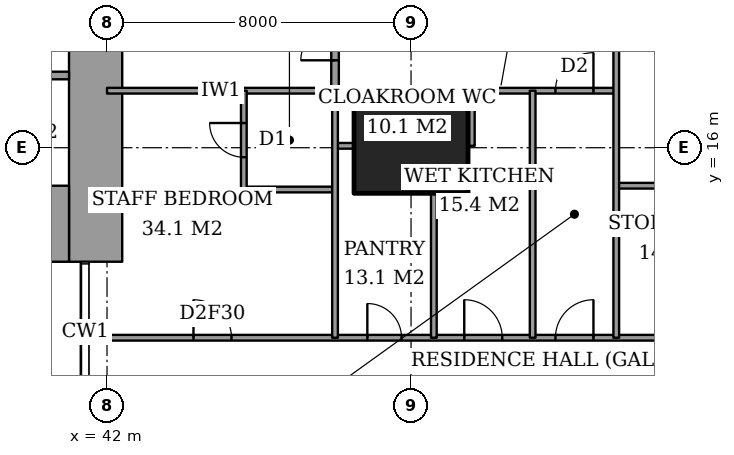
"""IFC4 building model, lengths in metres.
Left out: names, types, materials, properties, quantities, classifications, styles, units other than length and angle.
Written with IfcOpenShell. Run it as: python <this file> out.ifc"""

import sys

from ifc_helpers import new_model, si_unit, direction, frame, frame_2d, origin, origin_2d, place, context, subcontext, project, spatial, rectangle, extrude, element, fill, save


model = new_model("IFC4")
c1 = context("Model", 3, precision=1e-05, world=origin(), true_north=direction((0.0, 1.0)))
c2 = subcontext(c1, "Body", "Model", "MODEL_VIEW")
j1 = project(units=[si_unit("LENGTHUNIT", "METRE"), si_unit("PLANEANGLEUNIT", "RADIAN")], contexts=[c1])
p1 = place(None, origin())
s1 = spatial("IfcSite", under=j1, at=p1, CompositionType="ELEMENT")
p2 = place(p1, origin())
s2 = spatial("IfcBuilding", under=s1, at=p2, CompositionType="ELEMENT")
p3 = place(p2, frame((0.0, 0.0, 211.0)))
s3 = spatial("IfcBuildingStorey", under=s2, at=p3, CompositionType="ELEMENT", Elevation=211.0)
p4 = place(p3, frame((50.0, 16.0, 0.0), z_axis=(0.0, 0.0, 1.0), x_axis=(1.0, 0.0, 0.0)))
e1 = element("IfcColumn", 1, at=p4, inside=s3, PredefinedType="COLUMN", context=c2, shape_type="SweptSolid", body=[
    extrude(rectangle(XDim=3.0, YDim=2.4, at=origin_2d()), origin(), (0.0, 0.0, 1.0), 3.6),
])
p5 = place(p3, frame((37.85, 14.0, 0.0), z_axis=(0.0, 0.0, 1.0), x_axis=(1.0, 0.0, 0.0)))
e2 = element("IfcWall", 2, at=p5, inside=s3, PredefinedType="SHEAR", context=c2, shape_type="SweptSolid", body=[
    extrude(rectangle(XDim=3.15, YDim=2.0, at=frame_2d((1.575, 0.0))), origin(), (0.0, 0.0, 1.0), 3.6),
])
p6 = place(p3, frame((41.7, 13.0, 0.0), z_axis=(0.0, 0.0, 1.0), x_axis=(0.0, 1.0, 0.0)))
e3 = element("IfcWall", 3, at=p6, inside=s3, PredefinedType="SHEAR", context=c2, shape_type="SweptSolid", body=[
    extrude(rectangle(XDim=11.85, YDim=1.4, at=frame_2d((5.925, 0.0))), origin(), (0.0, 0.0, 1.0), 3.6),
])
p7 = place(p6, frame((7.5, 0.0, 0.0)))
e4 = element("IfcOpeningElement", 4, at=p7, cuts=e3, PredefinedType="OPENING", context=c2, shape_type="SweptSolid", body=[
    extrude(rectangle(XDim=1.8, YDim=2.4, at=frame_2d((0.9, 1.2))), frame((0.0, 0.71, 0.0), z_axis=(0.0, -1.0, 0.0), x_axis=(1.0, 0.0, 0.0)), (0.0, 0.0, 1.0), 1.42),
])
p8 = place(p3, frame((41.439, 11.0, 0.0), z_axis=(0.0, 0.0, 1.0), x_axis=(1.0, 0.0, 0.0)))
e5 = element("IfcWall", 5, at=p8, inside=s3, PredefinedType="PARTITIONING", context=c2, shape_type="SweptSolid", body=[
    extrude(rectangle(XDim=25.011, YDim=0.15, at=frame_2d((12.505, 0.0))), origin(), (0.0, 0.0, 1.0), 3.35),
])
p9 = place(p8, frame((12.361, 0.0, 0.0)))
e6 = element("IfcOpeningElement", 6, at=p9, cuts=e5, PredefinedType="OPENING", context=c2, shape_type="SweptSolid", body=[
    extrude(rectangle(XDim=1.0, YDim=2.1, at=frame_2d((0.5, 1.05))), frame((0.0, 0.085, 0.0), z_axis=(0.0, -1.0, 0.0), x_axis=(1.0, 0.0, 0.0)), (0.0, 0.0, 1.0), 0.17),
])
p10 = place(p8, frame((20.924, 0.0, 0.0)))
e7 = element("IfcOpeningElement", 7, at=p10, cuts=e5, PredefinedType="OPENING", context=c2, shape_type="SweptSolid", body=[
    extrude(rectangle(XDim=1.0, YDim=2.1, at=frame_2d((0.5, 1.05))), frame((0.0, 0.085, 0.0), z_axis=(0.0, -1.0, 0.0), x_axis=(1.0, 0.0, 0.0)), (0.0, 0.0, 1.0), 0.17),
])
p11 = place(p8, frame((15.448, 0.0, 0.0)))
e8 = element("IfcOpeningElement", 8, at=p11, cuts=e5, PredefinedType="OPENING", context=c2, shape_type="SweptSolid", body=[
    extrude(rectangle(XDim=0.9, YDim=2.1, at=frame_2d((0.45, 1.05))), frame((0.0, 0.085, 0.0), z_axis=(0.0, -1.0, 0.0), x_axis=(1.0, 0.0, 0.0)), (0.0, 0.0, 1.0), 0.17),
])
p12 = place(p8, frame((9.961, 0.0, 0.0)))
e9 = element("IfcOpeningElement", 9, at=p12, cuts=e5, PredefinedType="OPENING", context=c2, shape_type="SweptSolid", body=[
    extrude(rectangle(XDim=1.0, YDim=2.1, at=frame_2d((0.5, 1.05))), frame((0.0, 0.085, 0.0), z_axis=(0.0, -1.0, 0.0), x_axis=(1.0, 0.0, 0.0)), (0.0, 0.0, 1.0), 0.17),
])
p13 = place(p8, frame((7.411, 0.0, 0.0)))
e10 = element("IfcOpeningElement", 10, at=p13, cuts=e5, PredefinedType="OPENING", context=c2, shape_type="SweptSolid", body=[
    extrude(rectangle(XDim=0.9, YDim=2.1, at=frame_2d((0.45, 1.05))), frame((0.0, 0.085, 0.0), z_axis=(0.0, -1.0, 0.0), x_axis=(1.0, 0.0, 0.0)), (0.0, 0.0, 1.0), 0.17),
])
p14 = place(p8, frame((2.836, 0.0, 0.0)))
e11 = element("IfcOpeningElement", 11, at=p14, cuts=e5, PredefinedType="OPENING", context=c2, shape_type="SweptSolid", body=[
    extrude(rectangle(XDim=1.0, YDim=2.1, at=frame_2d((0.5, 1.05))), frame((0.0, 0.085, 0.0), z_axis=(0.0, -1.0, 0.0), x_axis=(1.0, 0.0, 0.0)), (0.0, 0.0, 1.0), 0.17),
])
p15 = place(p3, frame((45.6, 14.9, 0.0), z_axis=(0.0, 0.0, 1.0), x_axis=(1.0, 0.0, 0.0)))
e12 = element("IfcWall", 12, at=p15, inside=s3, PredefinedType="PARTITIONING", context=c2, shape_type="SweptSolid", body=[
    extrude(rectangle(XDim=2.4, YDim=0.15, at=frame_2d((1.2, 0.0))), origin(), (0.0, 0.0, 1.0), 3.35),
])
p16 = place(p3, frame((55.4, 15.0, 0.0), z_axis=(0.0, 0.0, 1.0), x_axis=(1.0, 0.0, 0.0)))
e13 = element("IfcWall", 13, at=p16, inside=s3, PredefinedType="PARTITIONING", context=c2, shape_type="SweptSolid", body=[
    extrude(rectangle(XDim=1.1, YDim=0.15, at=frame_2d((0.55, 0.0))), origin(), (0.0, 0.0, 1.0), 3.35),
])
p17 = place(p3, frame((48.0, 16.05, 0.0), z_axis=(0.0, 0.0, 1.0), x_axis=(1.0, 0.0, 0.0)))
e14 = element("IfcWall", 14, at=p17, inside=s3, PredefinedType="PARTITIONING", context=c2, shape_type="SweptSolid", body=[
    extrude(rectangle(XDim=0.5, YDim=0.15, at=frame_2d((0.25, 0.0))), origin(), (0.0, 0.0, 1.0), 2.634),
])
p18 = place(p3, frame((42.0, 17.5, 0.0), z_axis=(0.0, 0.0, 1.0), x_axis=(1.0, 0.0, 0.0)))
e15 = element("IfcWall", 15, at=p18, inside=s3, PredefinedType="PARTITIONING", context=c2, shape_type="SweptSolid", body=[
    extrude(rectangle(XDim=6.0, YDim=0.15, at=frame_2d((3.0, 0.0))), origin(), (0.0, 0.0, 1.0), 3.35),
])
p19 = place(p3, frame((51.6, 17.5, 0.0), z_axis=(0.0, 0.0, 1.0), x_axis=(1.0, 0.0, 0.0)))
e16 = element("IfcWall", 16, at=p19, inside=s3, PredefinedType="PARTITIONING", context=c2, shape_type="SweptSolid", body=[
    extrude(rectangle(XDim=3.8, YDim=0.15, at=frame_2d((1.9, 0.0))), origin(), (0.0, 0.0, 1.0), 3.35),
])
p20 = place(p19, frame((2.2, 0.0, 0.0)))
e17 = element("IfcOpeningElement", 17, at=p20, cuts=e16, PredefinedType="OPENING", context=c2, shape_type="SweptSolid", body=[
    extrude(rectangle(XDim=1.0, YDim=2.1, at=frame_2d((0.5, 1.05))), frame((0.0, 0.085, 0.0), z_axis=(0.0, -1.0, 0.0), x_axis=(1.0, 0.0, 0.0)), (0.0, 0.0, 1.0), 0.17),
])
p21 = place(p3, frame((45.6, 14.9, 0.0), z_axis=(0.0, 0.0, 1.0), x_axis=(0.0, 1.0, 0.0)))
e18 = element("IfcWall", 18, at=p21, inside=s3, PredefinedType="PARTITIONING", context=c2, shape_type="SweptSolid", body=[
    extrude(rectangle(XDim=2.6, YDim=0.15, at=frame_2d((1.3, 0.0))), origin(), (0.0, 0.0, 1.0), 3.35),
])
p22 = place(p21, frame((0.85, 0.0, 0.0)))
e19 = element("IfcOpeningElement", 19, at=p22, cuts=e18, PredefinedType="OPENING", context=c2, shape_type="SweptSolid", body=[
    extrude(rectangle(XDim=0.9, YDim=2.1, at=frame_2d((0.45, 1.05))), frame((0.0, 0.085, 0.0), z_axis=(0.0, -1.0, 0.0), x_axis=(1.0, 0.0, 0.0)), (0.0, 0.0, 1.0), 0.17),
])
p23 = place(p3, frame((48.0, 17.5, 0.0), z_axis=(0.0, 0.0, 1.0), x_axis=(0.0, 1.0, 0.0)))
e20 = element("IfcWall", 20, at=p23, inside=s3, PredefinedType="PARTITIONING", context=c2, shape_type="SweptSolid", body=[
    extrude(rectangle(XDim=6.5, YDim=0.2, at=frame_2d((3.25, 0.0))), origin(), (0.0, 0.0, 1.0), 3.35),
])
p24 = place(p23, frame((3.9, 0.0, 0.0)))
e21 = element("IfcOpeningElement", 21, at=p24, cuts=e20, PredefinedType="OPENING", context=c2, shape_type="SweptSolid", body=[
    extrude(rectangle(XDim=1.2, YDim=2.4, at=frame_2d((0.6, 1.2))), frame((0.0, 0.11, 0.0), z_axis=(0.0, -1.0, 0.0), x_axis=(1.0, 0.0, 0.0)), (0.0, 0.0, 1.0), 0.22),
])
p25 = place(p23, frame((0.8, 0.0, 0.0)))
e22 = element("IfcOpeningElement", 22, at=p25, cuts=e20, PredefinedType="OPENING", context=c2, shape_type="SweptSolid", body=[
    extrude(rectangle(XDim=0.9, YDim=2.1, at=frame_2d((0.45, 1.05))), frame((0.0, 0.11, 0.0), z_axis=(0.0, -1.0, 0.0), x_axis=(1.0, 0.0, 0.0)), (0.0, 0.0, 1.0), 0.22),
])
p26 = place(p3, frame((48.0, 11.0, 0.0), z_axis=(0.0, 0.0, 1.0), x_axis=(0.0, 1.0, 0.0)))
e23 = element("IfcWall", 23, at=p26, inside=s3, PredefinedType="PARTITIONING", context=c2, shape_type="SweptSolid", body=[
    extrude(rectangle(XDim=6.5, YDim=0.15, at=frame_2d((3.25, 0.0))), origin(), (0.0, 0.0, 1.0), 3.35),
])
p27 = place(p3, frame((50.6, 11.0, 0.0), z_axis=(0.0, 0.0, 1.0), x_axis=(0.0, 1.0, 0.0)))
e24 = element("IfcWall", 24, at=p27, inside=s3, PredefinedType="PARTITIONING", context=c2, shape_type="SweptSolid", body=[
    extrude(rectangle(XDim=3.8, YDim=0.15, at=frame_2d((1.9, 0.0))), origin(), (0.0, 0.0, 1.0), 3.35),
])
p28 = place(p3, frame((51.6, 16.05, 0.0), z_axis=(0.0, 0.0, 1.0), x_axis=(0.0, 1.0, 0.0)))
e25 = element("IfcWall", 25, at=p28, inside=s3, PredefinedType="PARTITIONING", context=c2, shape_type="SweptSolid", body=[
    extrude(rectangle(XDim=1.45, YDim=0.15, at=frame_2d((0.725, 0.0))), origin(), (0.0, 0.0, 1.0), 3.35),
])
p29 = place(p3, frame((53.2, 11.0, 0.0), z_axis=(0.0, 0.0, 1.0), x_axis=(0.0, 1.0, 0.0)))
e26 = element("IfcWall", 26, at=p29, inside=s3, PredefinedType="PARTITIONING", context=c2, shape_type="SweptSolid", body=[
    extrude(rectangle(XDim=6.5, YDim=0.15, at=frame_2d((3.25, 0.0))), origin(), (0.0, 0.0, 1.0), 3.35),
])
p30 = place(p3, frame((55.4, 11.0, 0.0), z_axis=(0.0, 0.0, 1.0), x_axis=(0.0, 1.0, 0.0)))
e27 = element("IfcWall", 27, at=p30, inside=s3, PredefinedType="PARTITIONING", context=c2, shape_type="SweptSolid", body=[
    extrude(rectangle(XDim=10.6, YDim=0.15, at=frame_2d((5.3, 0.0))), origin(), (0.0, 0.0, 1.0), 3.35),
])
p31 = place(p30, frame((8.05, 0.0, 0.0)))
e28 = element("IfcOpeningElement", 28, at=p31, cuts=e27, PredefinedType="OPENING", context=c2, shape_type="SweptSolid", body=[
    extrude(rectangle(XDim=1.0, YDim=2.1, at=frame_2d((0.5, 1.05))), frame((0.0, 0.085, 0.0), z_axis=(0.0, -1.0, 0.0), x_axis=(1.0, 0.0, 0.0)), (0.0, 0.0, 1.0), 0.17),
])
p32 = place(p3, frame((28.3, 17.9, 0.0), z_axis=(0.0, 0.0, 1.0), x_axis=(1.0, 0.0, 0.0)))
e29 = element("IfcWall", 29, at=p32, inside=s3, PredefinedType="PARTITIONING", context=c2, shape_type="SweptSolid", body=[
    extrude(rectangle(XDim=12.7, YDim=0.2, at=frame_2d((6.35, 0.0))), origin(), (0.0, 0.0, 1.0), 3.6),
])
p33 = place(p32, frame((1.05, 0.0, 0.0)))
e30 = element("IfcOpeningElement", 30, at=p33, cuts=e29, PredefinedType="OPENING", context=c2, shape_type="SweptSolid", body=[
    extrude(rectangle(XDim=0.9, YDim=2.1, at=frame_2d((0.45, 1.05))), frame((0.0, 0.11, 0.0), z_axis=(0.0, -1.0, 0.0), x_axis=(1.0, 0.0, 0.0)), (0.0, 0.0, 1.0), 0.22),
])
p34 = place(p32, frame((10.6, 0.0, 0.0)))
e31 = element("IfcOpeningElement", 31, at=p34, cuts=e29, PredefinedType="OPENING", context=c2, shape_type="SweptSolid", body=[
    extrude(rectangle(XDim=1.2, YDim=2.1, at=frame_2d((0.6, 1.05))), frame((0.0, 0.11, 0.0), z_axis=(0.0, -1.0, 0.0), x_axis=(1.0, 0.0, 0.0)), (0.0, 0.0, 1.0), 0.22),
])
p35 = place(p9, origin())
e32 = element("IfcDoor", 32, at=p35, inside=s3, OperationType="SINGLE_SWING_LEFT", PredefinedType="DOOR", context=c2, shape_type="SweptSolid", body=[
    extrude(rectangle(XDim=1.0, YDim=2.1, at=frame_2d((0.5, 1.05))), frame((0.0, 0.025, 0.0), z_axis=(0.0, -1.0, 0.0), x_axis=(1.0, 0.0, 0.0)), (0.0, 0.0, 1.0), 0.05),
])
fill(e6, e32)
p36 = place(p20, origin())
e33 = element("IfcDoor", 33, at=p36, inside=s3, OperationType="SINGLE_SWING_LEFT", PredefinedType="DOOR", context=c2, shape_type="SweptSolid", body=[
    extrude(rectangle(XDim=1.0, YDim=2.1, at=frame_2d((0.5, 1.05))), frame((0.0, 0.025, 0.0), z_axis=(0.0, -1.0, 0.0), x_axis=(1.0, 0.0, 0.0)), (0.0, 0.0, 1.0), 0.05),
])
fill(e17, e33)
p37 = place(p12, origin())
e34 = element("IfcDoor", 34, at=p37, inside=s3, OperationType="SINGLE_SWING_RIGHT", PredefinedType="DOOR", context=c2, shape_type="SweptSolid", body=[
    extrude(rectangle(XDim=1.0, YDim=2.1, at=frame_2d((0.5, 1.05))), frame((0.0, 0.025, 0.0), z_axis=(0.0, -1.0, 0.0), x_axis=(1.0, 0.0, 0.0)), (0.0, 0.0, 1.0), 0.05),
])
fill(e9, e34)
p38 = place(p13, origin())
e35 = element("IfcDoor", 35, at=p38, inside=s3, OperationType="SINGLE_SWING_RIGHT", PredefinedType="DOOR", context=c2, shape_type="SweptSolid", body=[
    extrude(rectangle(XDim=0.9, YDim=2.1, at=frame_2d((0.45, 1.05))), frame((0.0, 0.025, 0.0), z_axis=(0.0, -1.0, 0.0), x_axis=(1.0, 0.0, 0.0)), (0.0, 0.0, 1.0), 0.05),
])
fill(e10, e35)
p39 = place(p22, origin())
e36 = element("IfcDoor", 36, at=p39, inside=s3, OperationType="SINGLE_SWING_LEFT", PredefinedType="DOOR", context=c2, shape_type="SweptSolid", body=[
    extrude(rectangle(XDim=0.9, YDim=2.1, at=frame_2d((0.45, 1.05))), frame((0.0, 0.025, 0.0), z_axis=(0.0, -1.0, 0.0), x_axis=(1.0, 0.0, 0.0)), (0.0, 0.0, 1.0), 0.05),
])
fill(e19, e36)
p40 = place(p14, origin())
e37 = element("IfcDoor", 37, at=p40, inside=s3, OperationType="SINGLE_SWING_RIGHT", PredefinedType="DOOR", context=c2, shape_type="SweptSolid", body=[
    extrude(rectangle(XDim=1.0, YDim=2.1, at=frame_2d((0.5, 1.05))), frame((0.0, 0.025, 0.0), z_axis=(0.0, -1.0, 0.0), x_axis=(1.0, 0.0, 0.0)), (0.0, 0.0, 1.0), 0.05),
])
fill(e11, e37)
p41 = place(p25, origin())
e38 = element("IfcDoor", 38, at=p41, inside=s3, OperationType="SINGLE_SWING_RIGHT", PredefinedType="DOOR", context=c2, shape_type="SweptSolid", body=[
    extrude(rectangle(XDim=0.9, YDim=2.1, at=frame_2d((0.45, 1.05))), frame((0.0, 0.025, 0.0), z_axis=(0.0, -1.0, 0.0), x_axis=(1.0, 0.0, 0.0)), (0.0, 0.0, 1.0), 0.05),
])
fill(e22, e38)
save(model, sys.argv[1])
